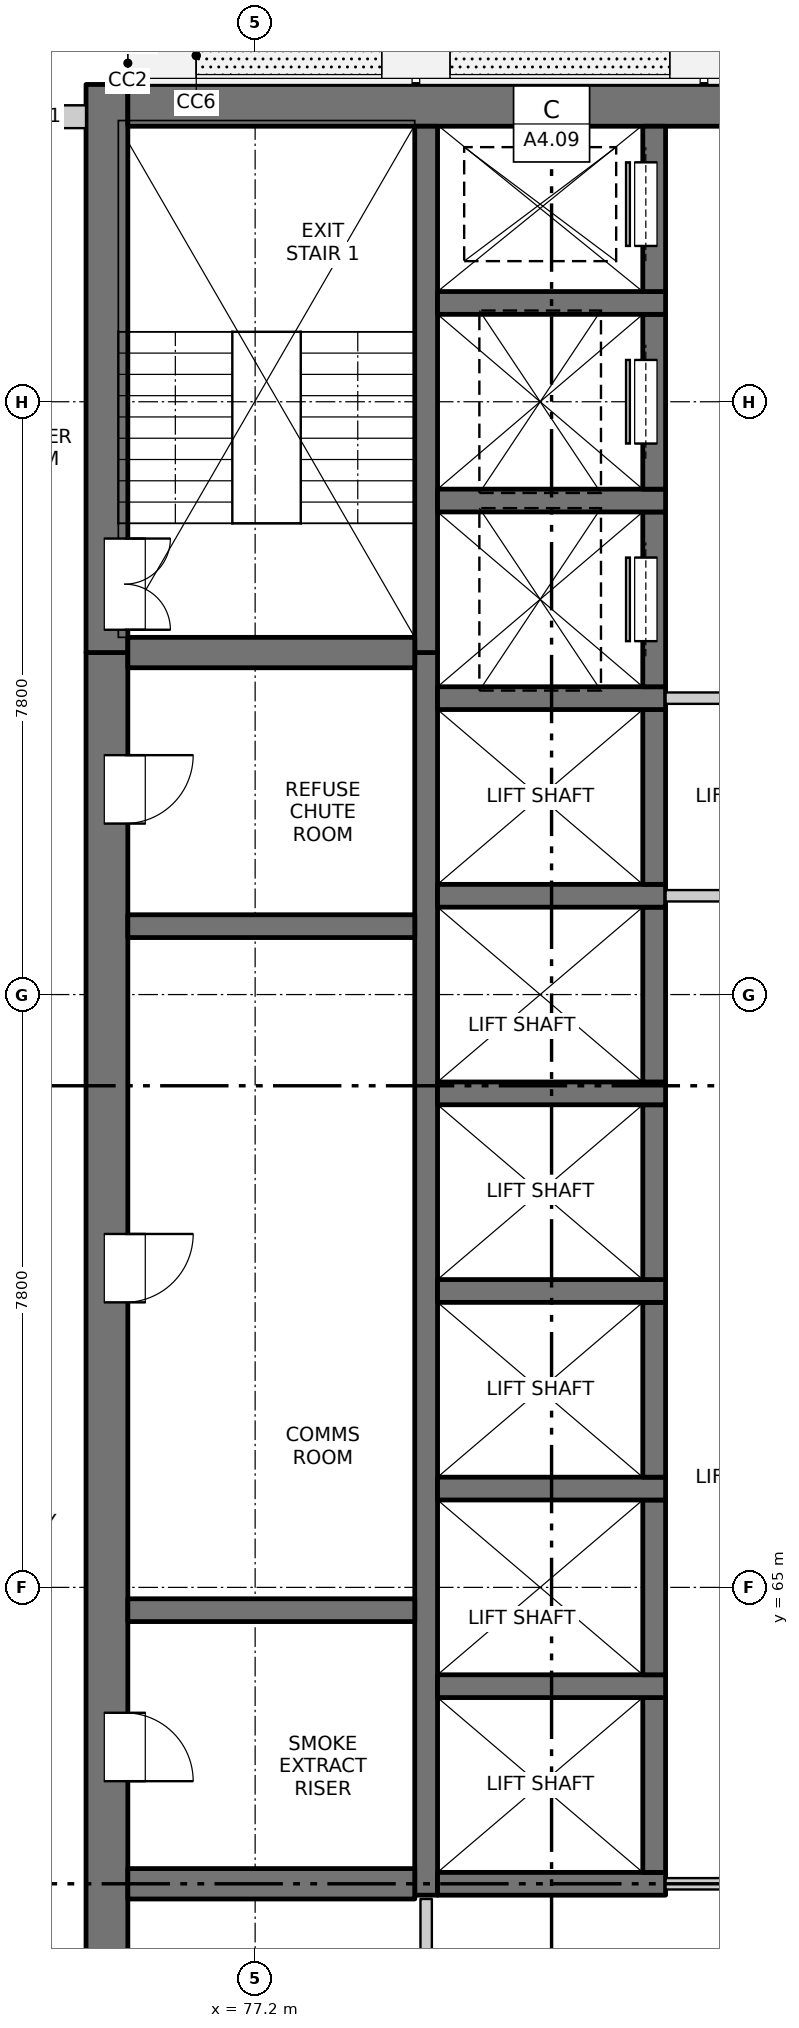
"""IFC4 building model, lengths in metres.
Left out: names, types, materials, properties, quantities, classifications, styles, units other than length and angle.
Written with IfcOpenShell. Run it as: python <this file> out.ifc"""

import sys

from ifc_helpers import new_model, si_unit, direction, frame, frame_2d, origin, place, context, subcontext, project, spatial, rectangle, extrude, element, fill, save


model = new_model("IFC4")
c1 = context("Model", 3, precision=1e-05, world=origin(), true_north=direction((0.0, 1.0)))
c2 = subcontext(c1, "Body", "Model", "MODEL_VIEW")
j1 = project(units=[si_unit("LENGTHUNIT", "METRE"), si_unit("PLANEANGLEUNIT", "RADIAN")], contexts=[c1])
p1 = place(None, origin())
s1 = spatial("IfcSite", under=j1, at=p1, CompositionType="ELEMENT")
p2 = place(p1, origin())
s2 = spatial("IfcBuilding", under=s1, at=p2, CompositionType="ELEMENT")
p3 = place(p2, frame((0.0, 0.0, 137.3)))
s3 = spatial("IfcBuildingStorey", under=s2, at=p3, CompositionType="ELEMENT", Elevation=137.3)
p4 = place(p3, frame((75.25, 54.975, -0.25), z_axis=(0.0, 0.0, 1.0), x_axis=(0.0, 1.0, 0.0)))
e1 = element("IfcWall", 1, at=p4, inside=s3, PredefinedType="SOLIDWALL", context=c2, shape_type="SweptSolid", body=[
    extrude(rectangle(XDim=22.325, YDim=0.55, at=frame_2d((11.163, 0.0))), origin(), (0.0, 0.0, 1.0), 3.4),
])
p5 = place(p4, frame((7.475, 0.0, 0.25)))
e2 = element("IfcOpeningElement", 2, at=p5, cuts=e1, PredefinedType="OPENING", context=c2, shape_type="SweptSolid", body=[
    extrude(rectangle(XDim=0.9, YDim=2.1, at=frame_2d((0.45, 1.05))), frame((0.0, 0.285, 0.0), z_axis=(0.0, -1.0, 0.0), x_axis=(1.0, 0.0, 0.0)), (0.0, 0.0, 1.0), 0.57),
])
p6 = place(p4, frame((13.775, 0.0, 0.25)))
e3 = element("IfcOpeningElement", 3, at=p6, cuts=e1, PredefinedType="OPENING", context=c2, shape_type="SweptSolid", body=[
    extrude(rectangle(XDim=0.9, YDim=2.1, at=frame_2d((0.45, 1.05))), frame((0.0, 0.285, 0.0), z_axis=(0.0, -1.0, 0.0), x_axis=(1.0, 0.0, 0.0)), (0.0, 0.0, 1.0), 0.57),
])
p7 = place(p4, frame((20.075, 0.0, 0.25)))
e4 = element("IfcOpeningElement", 4, at=p7, cuts=e1, PredefinedType="OPENING", context=c2, shape_type="SweptSolid", body=[
    extrude(rectangle(XDim=0.9, YDim=2.1, at=frame_2d((0.45, 1.05))), frame((0.0, 0.285, 0.0), z_axis=(0.0, -1.0, 0.0), x_axis=(1.0, 0.0, 0.0)), (0.0, 0.0, 1.0), 0.57),
])
p8 = place(p3, frame((75.25, 77.3, -0.25), z_axis=(0.0, 0.0, 1.0), x_axis=(0.0, 1.0, 0.0)))
e5 = element("IfcWall", 5, at=p8, inside=s3, PredefinedType="SOLIDWALL", context=c2, shape_type="SweptSolid", body=[
    extrude(rectangle(XDim=7.475, YDim=0.55, at=frame_2d((3.737, 0.0))), origin(), (0.0, 0.0, 1.0), 3.4),
])
p9 = place(p8, frame((0.3, 0.0, 0.25)))
e6 = element("IfcOpeningElement", 6, at=p9, cuts=e5, PredefinedType="OPENING", context=c2, shape_type="SweptSolid", body=[
    extrude(rectangle(XDim=1.2, YDim=2.1, at=frame_2d((0.6, 1.05))), frame((0.0, 0.285, 0.0), z_axis=(0.0, -1.0, 0.0), x_axis=(1.0, 0.0, 0.0)), (0.0, 0.0, 1.0), 0.57),
])
p10 = place(p3, frame((75.525, 84.5, -0.25), z_axis=(0.0, 0.0, 1.0), x_axis=(1.0, 0.0, 0.0)))
e7 = element("IfcWall", 7, at=p10, inside=s3, PredefinedType="SOLIDWALL", context=c2, shape_type="SweptSolid", body=[
    extrude(rectangle(XDim=18.95, YDim=0.55, at=frame_2d((9.475, 0.0))), origin(), (0.0, 0.0, 1.0), 3.4),
])
p11 = place(p3, frame((79.45, 60.95, -0.25), z_axis=(0.0, 0.0, 1.0), x_axis=(0.0, 1.0, 0.0)))
e8 = element("IfcWall", 8, at=p11, inside=s3, PredefinedType="SOLIDWALL", context=c2, shape_type="SweptSolid", body=[
    extrude(rectangle(XDim=16.35, YDim=0.3, at=frame_2d((8.175, 0.0))), origin(), (0.0, 0.0, 1.0), 3.4),
])
p12 = place(p3, frame((79.45, 77.3, -0.25), z_axis=(0.0, 0.0, 1.0), x_axis=(0.0, 1.0, 0.0)))
e9 = element("IfcWall", 9, at=p12, inside=s3, PredefinedType="SOLIDWALL", context=c2, shape_type="SweptSolid", body=[
    extrude(rectangle(XDim=6.925, YDim=0.3, at=frame_2d((3.462, 0.0))), origin(), (0.0, 0.0, 1.0), 3.4),
])
p13 = place(p3, frame((79.6, 61.1, -0.25), z_axis=(0.0, 0.0, 1.0), x_axis=(1.0, 0.0, 0.0)))
e10 = element("IfcWall", 10, at=p13, inside=s3, PredefinedType="SOLIDWALL", context=c2, shape_type="SweptSolid", body=[
    extrude(rectangle(XDim=3.0, YDim=0.3, at=frame_2d((1.5, 0.0))), origin(), (0.0, 0.0, 1.0), 3.4),
])
p14 = place(p3, frame((82.45, 61.25, -0.25), z_axis=(0.0, 0.0, 1.0), x_axis=(0.0, 1.0, 0.0)))
e11 = element("IfcWall", 11, at=p14, inside=s3, PredefinedType="SOLIDWALL", context=c2, shape_type="SweptSolid", body=[
    extrude(rectangle(XDim=2.3, YDim=0.3, at=frame_2d((1.15, 0.0))), origin(), (0.0, 0.0, 1.0), 3.4),
])
p15 = place(p3, frame((79.6, 63.7, -0.25), z_axis=(0.0, 0.0, 1.0), x_axis=(1.0, 0.0, 0.0)))
e12 = element("IfcWall", 12, at=p15, inside=s3, PredefinedType="SOLIDWALL", context=c2, shape_type="SweptSolid", body=[
    extrude(rectangle(XDim=3.0, YDim=0.3, at=frame_2d((1.5, 0.0))), origin(), (0.0, 0.0, 1.0), 3.4),
])
p16 = place(p3, frame((82.45, 63.85, -0.25), z_axis=(0.0, 0.0, 1.0), x_axis=(0.0, 1.0, 0.0)))
e13 = element("IfcWall", 13, at=p16, inside=s3, PredefinedType="SOLIDWALL", context=c2, shape_type="SweptSolid", body=[
    extrude(rectangle(XDim=2.3, YDim=0.3, at=frame_2d((1.15, 0.0))), origin(), (0.0, 0.0, 1.0), 3.4),
])
p17 = place(p3, frame((79.6, 66.3, -0.25), z_axis=(0.0, 0.0, 1.0), x_axis=(1.0, 0.0, 0.0)))
e14 = element("IfcWall", 14, at=p17, inside=s3, PredefinedType="SOLIDWALL", context=c2, shape_type="SweptSolid", body=[
    extrude(rectangle(XDim=3.0, YDim=0.3, at=frame_2d((1.5, 0.0))), origin(), (0.0, 0.0, 1.0), 3.4),
])
p18 = place(p3, frame((82.45, 66.45, -0.25), z_axis=(0.0, 0.0, 1.0), x_axis=(0.0, 1.0, 0.0)))
e15 = element("IfcWall", 15, at=p18, inside=s3, PredefinedType="SOLIDWALL", context=c2, shape_type="SweptSolid", body=[
    extrude(rectangle(XDim=2.3, YDim=0.3, at=frame_2d((1.15, 0.0))), origin(), (0.0, 0.0, 1.0), 3.4),
])
p19 = place(p3, frame((79.6, 68.9, -0.25), z_axis=(0.0, 0.0, 1.0), x_axis=(1.0, 0.0, 0.0)))
e16 = element("IfcWall", 16, at=p19, inside=s3, PredefinedType="SOLIDWALL", context=c2, shape_type="SweptSolid", body=[
    extrude(rectangle(XDim=3.0, YDim=0.3, at=frame_2d((1.5, 0.0))), origin(), (0.0, 0.0, 1.0), 3.4),
])
p20 = place(p3, frame((82.45, 69.05, -0.25), z_axis=(0.0, 0.0, 1.0), x_axis=(0.0, 1.0, 0.0)))
e17 = element("IfcWall", 17, at=p20, inside=s3, PredefinedType="SOLIDWALL", context=c2, shape_type="SweptSolid", body=[
    extrude(rectangle(XDim=2.3, YDim=0.3, at=frame_2d((1.15, 0.0))), origin(), (0.0, 0.0, 1.0), 3.4),
])
p21 = place(p3, frame((79.6, 71.5, -0.25), z_axis=(0.0, 0.0, 1.0), x_axis=(1.0, 0.0, 0.0)))
e18 = element("IfcWall", 18, at=p21, inside=s3, PredefinedType="SOLIDWALL", context=c2, shape_type="SweptSolid", body=[
    extrude(rectangle(XDim=3.0, YDim=0.3, at=frame_2d((1.5, 0.0))), origin(), (0.0, 0.0, 1.0), 3.4),
])
p22 = place(p3, frame((82.45, 71.65, -0.25), z_axis=(0.0, 0.0, 1.0), x_axis=(0.0, 1.0, 0.0)))
e19 = element("IfcWall", 19, at=p22, inside=s3, PredefinedType="SOLIDWALL", context=c2, shape_type="SweptSolid", body=[
    extrude(rectangle(XDim=2.3, YDim=0.3, at=frame_2d((1.15, 0.0))), origin(), (0.0, 0.0, 1.0), 3.4),
])
p23 = place(p3, frame((79.6, 74.1, -0.25), z_axis=(0.0, 0.0, 1.0), x_axis=(1.0, 0.0, 0.0)))
e20 = element("IfcWall", 20, at=p23, inside=s3, PredefinedType="SOLIDWALL", context=c2, shape_type="SweptSolid", body=[
    extrude(rectangle(XDim=3.0, YDim=0.3, at=frame_2d((1.5, 0.0))), origin(), (0.0, 0.0, 1.0), 3.4),
])
p24 = place(p3, frame((82.45, 74.25, -0.25), z_axis=(0.0, 0.0, 1.0), x_axis=(0.0, 1.0, 0.0)))
e21 = element("IfcWall", 21, at=p24, inside=s3, PredefinedType="SOLIDWALL", context=c2, shape_type="SweptSolid", body=[
    extrude(rectangle(XDim=2.3, YDim=0.3, at=frame_2d((1.15, 0.0))), origin(), (0.0, 0.0, 1.0), 3.4),
])
p25 = place(p3, frame((79.6, 76.7, -0.25), z_axis=(0.0, 0.0, 1.0), x_axis=(1.0, 0.0, 0.0)))
e22 = element("IfcWall", 22, at=p25, inside=s3, PredefinedType="SOLIDWALL", context=c2, shape_type="SweptSolid", body=[
    extrude(rectangle(XDim=3.0, YDim=0.3, at=frame_2d((1.5, 0.0))), origin(), (0.0, 0.0, 1.0), 3.4),
])
p26 = place(p3, frame((82.45, 76.85, -0.25), z_axis=(0.0, 0.0, 1.0), x_axis=(0.0, 1.0, 0.0)))
e23 = element("IfcWall", 23, at=p26, inside=s3, PredefinedType="SOLIDWALL", context=c2, shape_type="SweptSolid", body=[
    extrude(rectangle(XDim=2.3, YDim=0.3, at=frame_2d((1.15, 0.0))), origin(), (0.0, 0.0, 1.0), 3.4),
])
p27 = place(p26, frame((0.6, 0.0, 0.25)))
e24 = element("IfcOpeningElement", 24, at=p27, cuts=e23, PredefinedType="OPENING", context=c2, shape_type="SweptSolid", body=[
    extrude(rectangle(XDim=1.1, YDim=2.1, at=frame_2d((0.55, 1.05))), frame((0.0, 0.16, 0.0), z_axis=(0.0, -1.0, 0.0), x_axis=(1.0, 0.0, 0.0)), (0.0, 0.0, 1.0), 0.32),
])
p28 = place(p3, frame((79.6, 79.3, -0.25), z_axis=(0.0, 0.0, 1.0), x_axis=(1.0, 0.0, 0.0)))
e25 = element("IfcWall", 25, at=p28, inside=s3, PredefinedType="SOLIDWALL", context=c2, shape_type="SweptSolid", body=[
    extrude(rectangle(XDim=3.0, YDim=0.3, at=frame_2d((1.5, 0.0))), origin(), (0.0, 0.0, 1.0), 3.4),
])
p29 = place(p3, frame((82.45, 79.45, -0.25), z_axis=(0.0, 0.0, 1.0), x_axis=(0.0, 1.0, 0.0)))
e26 = element("IfcWall", 26, at=p29, inside=s3, PredefinedType="SOLIDWALL", context=c2, shape_type="SweptSolid", body=[
    extrude(rectangle(XDim=2.3, YDim=0.3, at=frame_2d((1.15, 0.0))), origin(), (0.0, 0.0, 1.0), 3.4),
])
p30 = place(p29, frame((0.6, 0.0, 0.25)))
e27 = element("IfcOpeningElement", 27, at=p30, cuts=e26, PredefinedType="OPENING", context=c2, shape_type="SweptSolid", body=[
    extrude(rectangle(XDim=1.1, YDim=2.1, at=frame_2d((0.55, 1.05))), frame((0.0, 0.16, 0.0), z_axis=(0.0, -1.0, 0.0), x_axis=(1.0, 0.0, 0.0)), (0.0, 0.0, 1.0), 0.32),
])
p31 = place(p3, frame((79.6, 81.9, -0.25), z_axis=(0.0, 0.0, 1.0), x_axis=(1.0, 0.0, 0.0)))
e28 = element("IfcWall", 28, at=p31, inside=s3, PredefinedType="SOLIDWALL", context=c2, shape_type="SweptSolid", body=[
    extrude(rectangle(XDim=3.0, YDim=0.3, at=frame_2d((1.5, 0.0))), origin(), (0.0, 0.0, 1.0), 3.4),
])
p32 = place(p3, frame((82.45, 82.05, -0.25), z_axis=(0.0, 0.0, 1.0), x_axis=(0.0, 1.0, 0.0)))
e29 = element("IfcWall", 29, at=p32, inside=s3, PredefinedType="SOLIDWALL", context=c2, shape_type="SweptSolid", body=[
    extrude(rectangle(XDim=2.175, YDim=0.3, at=frame_2d((1.087, 0.0))), origin(), (0.0, 0.0, 1.0), 3.4),
])
p33 = place(p32, frame((0.6, 0.0, 0.25)))
e30 = element("IfcOpeningElement", 30, at=p33, cuts=e29, PredefinedType="OPENING", context=c2, shape_type="SweptSolid", body=[
    extrude(rectangle(XDim=1.1, YDim=2.1, at=frame_2d((0.55, 1.05))), frame((0.0, 0.16, 0.0), z_axis=(0.0, -1.0, 0.0), x_axis=(1.0, 0.0, 0.0)), (0.0, 0.0, 1.0), 0.32),
])
p34 = place(p3, frame((75.525, 61.1, -0.25), z_axis=(0.0, 0.0, 1.0), x_axis=(1.0, 0.0, 0.0)))
e31 = element("IfcWall", 31, at=p34, inside=s3, PredefinedType="SOLIDWALL", context=c2, shape_type="SweptSolid", body=[
    extrude(rectangle(XDim=3.775, YDim=0.4, at=frame_2d((1.888, 0.0))), origin(), (0.0, 0.0, 1.0), 3.4),
])
for number, where, z_axis, x_axis in (
    (32, (75.525, 64.7, -0.25), (0.0, 0.0, 1.0), (1.0, 0.0, 0.0)),
    (33, (75.525, 73.7, -0.25), (0.0, 0.0, 1.0), (1.0, 0.0, 0.0)),
):
    element("IfcWall", number, at=place(p3, frame(where, z_axis=z_axis, x_axis=x_axis)), inside=s3, PredefinedType="SOLIDWALL", context=c2, shape_type="SweptSolid", body=[
        extrude(rectangle(XDim=3.775, YDim=0.3, at=frame_2d((1.888, 0.0))), origin(), (0.0, 0.0, 1.0), 3.4),
    ])
p35 = place(p3, frame((75.525, 77.3, -0.25), z_axis=(0.0, 0.0, 1.0), x_axis=(1.0, 0.0, 0.0)))
e34 = element("IfcWall", 34, at=p35, inside=s3, PredefinedType="SOLIDWALL", context=c2, shape_type="SweptSolid", body=[
    extrude(rectangle(XDim=3.775, YDim=0.4, at=frame_2d((1.888, 0.0))), origin(), (0.0, 0.0, 1.0), 3.4),
])
p36 = place(p3, frame((73.725, 84.35, 0.0), z_axis=(0.0, 0.0, 1.0), x_axis=(1.0, 0.0, 0.0)))
e35 = element("IfcWall", 35, at=p36, inside=s3, PredefinedType="SOLIDWALL", context=c2, shape_type="SweptSolid", body=[
    extrude(rectangle(XDim=1.25, YDim=0.3, at=frame_2d((0.625, 0.0))), origin(), (0.0, 0.0, 1.0), 2.7),
])
p37 = place(p3, frame((82.6, 61.1, 0.0), z_axis=(0.0, 0.0, 1.0), x_axis=(1.0, 0.0, 0.0)))
e36 = element("IfcWall", 36, at=p37, inside=s3, PredefinedType="PARTITIONING", context=c2, shape_type="SweptSolid", body=[
    extrude(rectangle(XDim=4.8, YDim=0.15, at=frame_2d((2.4, 0.0))), origin(), (0.0, 0.0, 1.0), 3.15),
])
p38 = place(p37, frame((1.5, 0.0, 0.0)))
e37 = element("IfcOpeningElement", 37, at=p38, cuts=e36, PredefinedType="OPENING", context=c2, shape_type="SweptSolid", body=[
    extrude(rectangle(XDim=1.8, YDim=2.1, at=frame_2d((0.9, 1.05))), frame((0.0, 0.085, 0.0), z_axis=(0.0, -1.0, 0.0), x_axis=(1.0, 0.0, 0.0)), (0.0, 0.0, 1.0), 0.17),
])
p39 = place(p3, frame((82.6, 74.1, 0.0), z_axis=(0.0, 0.0, 1.0), x_axis=(1.0, 0.0, 0.0)))
e38 = element("IfcWall", 38, at=p39, inside=s3, PredefinedType="PARTITIONING", context=c2, shape_type="SweptSolid", body=[
    extrude(rectangle(XDim=4.8, YDim=0.15, at=frame_2d((2.4, 0.0))), origin(), (0.0, 0.0, 1.0), 3.15),
])
p40 = place(p39, frame((1.5, 0.0, 0.0)))
e39 = element("IfcOpeningElement", 39, at=p40, cuts=e38, PredefinedType="OPENING", context=c2, shape_type="SweptSolid", body=[
    extrude(rectangle(XDim=1.8, YDim=2.1, at=frame_2d((0.9, 1.05))), frame((0.0, 0.085, 0.0), z_axis=(0.0, -1.0, 0.0), x_axis=(1.0, 0.0, 0.0)), (0.0, 0.0, 1.0), 0.17),
])
p41 = place(p3, frame((82.6, 76.7, 0.0), z_axis=(0.0, 0.0, 1.0), x_axis=(1.0, 0.0, 0.0)))
e40 = element("IfcWall", 40, at=p41, inside=s3, PredefinedType="PARTITIONING", context=c2, shape_type="SweptSolid", body=[
    extrude(rectangle(XDim=4.8, YDim=0.15, at=frame_2d((2.4, 0.0))), origin(), (0.0, 0.0, 1.0), 3.15),
])
p42 = place(p41, frame((1.5, 0.0, 0.0)))
e41 = element("IfcOpeningElement", 41, at=p42, cuts=e40, PredefinedType="OPENING", context=c2, shape_type="SweptSolid", body=[
    extrude(rectangle(XDim=1.8, YDim=2.1, at=frame_2d((0.9, 1.05))), frame((0.0, 0.085, 0.0), z_axis=(0.0, -1.0, 0.0), x_axis=(1.0, 0.0, 0.0)), (0.0, 0.0, 1.0), 0.17),
])
p43 = place(p3, frame((79.45, 55.525, 0.0), z_axis=(0.0, 0.0, 1.0), x_axis=(0.0, 1.0, 0.0)))
e42 = element("IfcWall", 42, at=p43, inside=s3, PredefinedType="PARTITIONING", context=c2, shape_type="SweptSolid", body=[
    extrude(rectangle(XDim=5.375, YDim=0.15, at=frame_2d((2.688, 0.0))), origin(), (0.0, 0.0, 1.0), 3.15),
])
p44 = place(p43, frame((2.175, 0.0, 0.0)))
e43 = element("IfcOpeningElement", 43, at=p44, cuts=e42, PredefinedType="OPENING", context=c2, shape_type="SweptSolid", body=[
    extrude(rectangle(XDim=0.9, YDim=2.1, at=frame_2d((0.45, 1.05))), frame((0.0, 0.085, 0.0), z_axis=(0.0, -1.0, 0.0), x_axis=(1.0, 0.0, 0.0)), (0.0, 0.0, 1.0), 0.17),
])
p45 = place(p5, origin())
e44 = element("IfcDoor", 44, at=p45, inside=s3, OperationType="SINGLE_SWING_RIGHT", PredefinedType="DOOR", context=c2, shape_type="SweptSolid", body=[
    extrude(rectangle(XDim=0.9, YDim=2.1, at=frame_2d((0.45, 1.05))), frame((0.0, -0.21, 0.0), z_axis=(0.0, -1.0, 0.0), x_axis=(1.0, 0.0, 0.0)), (0.0, 0.0, 1.0), 0.05),
])
fill(e2, e44)
p46 = place(p6, origin())
e45 = element("IfcDoor", 45, at=p46, inside=s3, OperationType="SINGLE_SWING_LEFT", PredefinedType="DOOR", context=c2, shape_type="SweptSolid", body=[
    extrude(rectangle(XDim=0.9, YDim=2.1, at=frame_2d((0.45, 1.05))), frame((0.0, -0.21, 0.0), z_axis=(0.0, -1.0, 0.0), x_axis=(1.0, 0.0, 0.0)), (0.0, 0.0, 1.0), 0.05),
])
fill(e3, e45)
p47 = place(p7, origin())
e46 = element("IfcDoor", 46, at=p47, inside=s3, OperationType="SINGLE_SWING_LEFT", PredefinedType="DOOR", context=c2, shape_type="SweptSolid", body=[
    extrude(rectangle(XDim=0.9, YDim=2.1, at=frame_2d((0.45, 1.05))), frame((0.0, -0.21, 0.0), z_axis=(0.0, -1.0, 0.0), x_axis=(1.0, 0.0, 0.0)), (0.0, 0.0, 1.0), 0.05),
])
fill(e4, e46)
p48 = place(p27, origin())
e47 = element("IfcDoor", 47, at=p48, inside=s3, OperationType="SLIDING_TO_LEFT", PredefinedType="DOOR", context=c2, shape_type="SweptSolid", body=[
    extrude(rectangle(XDim=1.1, YDim=2.1, at=frame_2d((0.55, 1.05))), frame((0.0, 0.135, 0.0), z_axis=(0.0, -1.0, 0.0), x_axis=(1.0, 0.0, 0.0)), (0.0, 0.0, 1.0), 0.05),
])
fill(e24, e47)
p49 = place(p9, origin())
e48 = element("IfcDoor", 48, at=p49, inside=s3, OperationType="DOUBLE_DOOR_SINGLE_SWING", PredefinedType="DOOR", context=c2, shape_type="SweptSolid", body=[
    extrude(rectangle(XDim=1.2, YDim=2.1, at=frame_2d((0.6, 1.05))), frame((0.0, -0.21, 0.0), z_axis=(0.0, -1.0, 0.0), x_axis=(1.0, 0.0, 0.0)), (0.0, 0.0, 1.0), 0.05),
])
fill(e6, e48)
p50 = place(p30, origin())
e49 = element("IfcDoor", 49, at=p50, inside=s3, OperationType="SLIDING_TO_LEFT", PredefinedType="DOOR", context=c2, shape_type="SweptSolid", body=[
    extrude(rectangle(XDim=1.1, YDim=2.1, at=frame_2d((0.55, 1.05))), frame((0.0, 0.135, 0.0), z_axis=(0.0, -1.0, 0.0), x_axis=(1.0, 0.0, 0.0)), (0.0, 0.0, 1.0), 0.05),
])
fill(e27, e49)
p51 = place(p33, origin())
e50 = element("IfcDoor", 50, at=p51, inside=s3, OperationType="SLIDING_TO_RIGHT", PredefinedType="DOOR", context=c2, shape_type="SweptSolid", body=[
    extrude(rectangle(XDim=1.1, YDim=2.1, at=frame_2d((0.55, 1.05))), frame((0.0, 0.135, 0.0), z_axis=(0.0, -1.0, 0.0), x_axis=(1.0, 0.0, 0.0)), (0.0, 0.0, 1.0), 0.05),
])
fill(e30, e50)
save(model, sys.argv[1])
